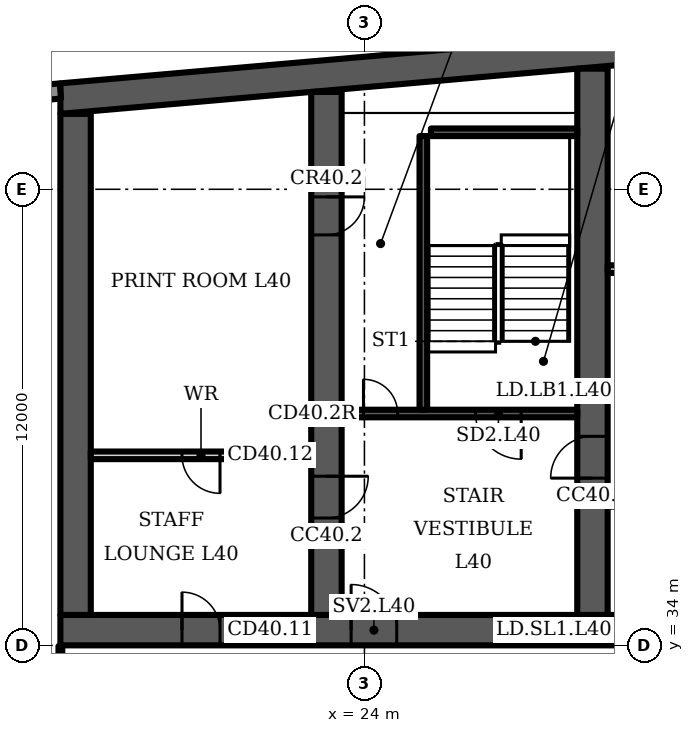
"""IFC4 building model, lengths in metres.
Left out: names, types, materials, properties, quantities, classifications, styles, units other than length and angle.
Written with IfcOpenShell. Run it as: python <this file> out.ifc"""

import sys

from ifc_helpers import new_model, si_unit, direction, frame, frame_2d, origin, place, context, subcontext, project, spatial, polyline, rectangle, outline, extrude, element, fill, save


model = new_model("IFC4")
c1 = context("Model", 3, precision=1e-05, world=origin(), true_north=direction((0.0, 1.0)))
c2 = subcontext(c1, "Body", "Model", "MODEL_VIEW")
j1 = project(units=[si_unit("LENGTHUNIT", "METRE"), si_unit("PLANEANGLEUNIT", "RADIAN")], contexts=[c1])
p1 = place(None, origin())
s1 = spatial("IfcSite", under=j1, at=p1, CompositionType="ELEMENT")
p2 = place(p1, origin())
s2 = spatial("IfcBuilding", under=s1, at=p2, CompositionType="ELEMENT")
p3 = place(p2, frame((0.0, 0.0, 166.3)))
s3 = spatial("IfcBuildingStorey", under=s2, at=p3, CompositionType="ELEMENT", Elevation=166.3)
p4 = place(p3, frame((0.0, 0.0, -0.0)))
e1 = element("IfcWall", 1, at=p4, inside=s3, PredefinedType="SHEAR", context=c2, shape_type="SweptSolid", body=[
    extrude(outline(polyline([(16.0, 47.984), (37.0, 49.822), (58.0, 47.984), (58.0, 48.787), (37.0, 50.625), (16.0, 48.787), (16.0, 47.984)])), origin(), (0.0, 0.0, 1.0), 3.6),
])
p5 = place(p3, frame((16.0, 34.4, 0.0), z_axis=(0.0, 0.0, 1.0), x_axis=(1.0, 0.0, 0.0)))
e2 = element("IfcWall", 2, at=p5, inside=s3, PredefinedType="SHEAR", context=c2, shape_type="SweptSolid", body=[
    extrude(rectangle(XDim=42.0, YDim=0.8, at=frame_2d((21.0, 0.0))), origin(), (0.0, 0.0, 1.0), 3.6),
])
p6 = place(p5, frame((3.2, 0.0, 0.0)))
e3 = element("IfcOpeningElement", 3, at=p6, cuts=e2, PredefinedType="OPENING", context=c2, shape_type="SweptSolid", body=[
    extrude(rectangle(XDim=1.0, YDim=2.1, at=frame_2d((0.5, 1.05))), frame((0.0, 0.41, 0.0), z_axis=(0.0, -1.0, 0.0), x_axis=(1.0, 0.0, 0.0)), (0.0, 0.0, 1.0), 0.82),
])
p7 = place(p5, frame((7.65, 0.0, 0.0)))
e4 = element("IfcOpeningElement", 4, at=p7, cuts=e2, PredefinedType="OPENING", context=c2, shape_type="SweptSolid", body=[
    extrude(rectangle(XDim=1.2, YDim=2.1, at=frame_2d((0.6, 1.05))), frame((0.0, 0.41, 0.0), z_axis=(0.0, -1.0, 0.0), x_axis=(1.0, 0.0, 0.0)), (0.0, 0.0, 1.0), 0.82),
])
p8 = place(p5, frame((14.767, 0.0, 0.0)))
e5 = element("IfcOpeningElement", 5, at=p8, cuts=e2, PredefinedType="OPENING", context=c2, shape_type="SweptSolid", body=[
    extrude(rectangle(XDim=1.1, YDim=2.1, at=frame_2d((0.55, 1.05))), frame((0.0, 0.41, 0.0), z_axis=(0.0, -1.0, 0.0), x_axis=(1.0, 0.0, 0.0)), (0.0, 0.0, 1.0), 0.82),
])
p9 = place(p5, frame((19.133, 0.0, 0.0)))
e6 = element("IfcOpeningElement", 6, at=p9, cuts=e2, PredefinedType="OPENING", context=c2, shape_type="SweptSolid", body=[
    extrude(rectangle(XDim=1.1, YDim=2.1, at=frame_2d((0.55, 1.05))), frame((0.0, 0.41, 0.0), z_axis=(0.0, -1.0, 0.0), x_axis=(1.0, 0.0, 0.0)), (0.0, 0.0, 1.0), 0.82),
])
p10 = place(p5, frame((16.8, 0.0, 0.0)))
e7 = element("IfcOpeningElement", 7, at=p10, cuts=e2, PredefinedType="OPENING", context=c2, shape_type="SweptSolid", body=[
    extrude(rectangle(XDim=1.4, YDim=2.1, at=frame_2d((0.7, 1.05))), frame((0.0, 0.41, 0.0), z_axis=(0.0, -1.0, 0.0), x_axis=(1.0, 0.0, 0.0)), (0.0, 0.0, 1.0), 0.82),
])
p11 = place(p5, frame((21.767, 0.0, 0.0)))
e8 = element("IfcOpeningElement", 8, at=p11, cuts=e2, PredefinedType="OPENING", context=c2, shape_type="SweptSolid", body=[
    extrude(rectangle(XDim=1.1, YDim=2.1, at=frame_2d((0.55, 1.05))), frame((0.0, 0.41, 0.0), z_axis=(0.0, -1.0, 0.0), x_axis=(1.0, 0.0, 0.0)), (0.0, 0.0, 1.0), 0.82),
])
p12 = place(p5, frame((23.95, 0.0, 0.0)))
e9 = element("IfcOpeningElement", 9, at=p12, cuts=e2, PredefinedType="OPENING", context=c2, shape_type="SweptSolid", body=[
    extrude(rectangle(XDim=1.1, YDim=2.1, at=frame_2d((0.55, 1.05))), frame((0.0, 0.41, 0.0), z_axis=(0.0, -1.0, 0.0), x_axis=(1.0, 0.0, 0.0)), (0.0, 0.0, 1.0), 0.82),
])
p13 = place(p5, frame((26.133, 0.0, 0.0)))
e10 = element("IfcOpeningElement", 10, at=p13, cuts=e2, PredefinedType="OPENING", context=c2, shape_type="SweptSolid", body=[
    extrude(rectangle(XDim=1.1, YDim=2.1, at=frame_2d((0.55, 1.05))), frame((0.0, 0.41, 0.0), z_axis=(0.0, -1.0, 0.0), x_axis=(1.0, 0.0, 0.0)), (0.0, 0.0, 1.0), 0.82),
])
p14 = place(p5, frame((33.15, 0.0, 0.0)))
e11 = element("IfcOpeningElement", 11, at=p14, cuts=e2, PredefinedType="OPENING", context=c2, shape_type="SweptSolid", body=[
    extrude(rectangle(XDim=1.2, YDim=2.1, at=frame_2d((0.6, 1.05))), frame((0.0, 0.41, 0.0), z_axis=(0.0, -1.0, 0.0), x_axis=(1.0, 0.0, 0.0)), (0.0, 0.0, 1.0), 0.82),
])
p15 = place(p5, frame((35.817, 0.0, 0.0)))
e12 = element("IfcOpeningElement", 12, at=p15, cuts=e2, PredefinedType="OPENING", context=c2, shape_type="SweptSolid", body=[
    extrude(rectangle(XDim=1.0, YDim=2.1, at=frame_2d((0.5, 1.05))), frame((0.0, 0.41, 0.0), z_axis=(0.0, -1.0, 0.0), x_axis=(1.0, 0.0, 0.0)), (0.0, 0.0, 1.0), 0.82),
])
p16 = place(p5, frame((39.95, 0.0, 0.0)))
e13 = element("IfcOpeningElement", 13, at=p16, cuts=e2, PredefinedType="OPENING", context=c2, shape_type="SweptSolid", body=[
    extrude(rectangle(XDim=1.0, YDim=2.1, at=frame_2d((0.5, 1.05))), frame((0.0, 0.41, 0.0), z_axis=(0.0, -1.0, 0.0), x_axis=(1.0, 0.0, 0.0)), (0.0, 0.0, 1.0), 0.82),
])
p17 = place(p5, frame((37.767, 0.0, 0.0)))
e14 = element("IfcOpeningElement", 14, at=p17, cuts=e2, PredefinedType="OPENING", context=c2, shape_type="SweptSolid", body=[
    extrude(rectangle(XDim=1.4, YDim=2.1, at=frame_2d((0.7, 1.05))), frame((0.0, 0.41, 0.0), z_axis=(0.0, -1.0, 0.0), x_axis=(1.0, 0.0, 0.0)), (0.0, 0.0, 1.0), 0.82),
])
p18 = place(p3, frame((16.4, 34.8, 0.0), z_axis=(0.0, 0.0, 1.0), x_axis=(0.0, 1.0, 0.0)))
e15 = element("IfcWall", 15, at=p18, inside=s3, PredefinedType="SHEAR", context=c2, shape_type="SweptSolid", body=[
    extrude(rectangle(XDim=13.184, YDim=0.8, at=frame_2d((6.592, 0.0))), origin(), (0.0, 0.0, 1.0), 3.6),
])
p19 = place(p3, frame((23.0, 34.8, 0.0), z_axis=(0.0, 0.0, 1.0), x_axis=(0.0, 1.0, 0.0)))
e16 = element("IfcWall", 16, at=p19, inside=s3, PredefinedType="SHEAR", context=c2, shape_type="SweptSolid", body=[
    extrude(rectangle(XDim=13.762, YDim=0.8, at=frame_2d((6.881, 0.0))), origin(), (0.0, 0.0, 1.0), 3.6),
])
p20 = place(p19, frame((2.55, 0.0, 0.0)))
e17 = element("IfcOpeningElement", 17, at=p20, cuts=e16, PredefinedType="OPENING", context=c2, shape_type="SweptSolid", body=[
    extrude(rectangle(XDim=1.1, YDim=2.1, at=frame_2d((0.55, 1.05))), frame((0.0, 0.41, 0.0), z_axis=(0.0, -1.0, 0.0), x_axis=(1.0, 0.0, 0.0)), (0.0, 0.0, 1.0), 0.82),
])
p21 = place(p19, frame((10.0, 0.0, 0.0)))
e18 = element("IfcOpeningElement", 18, at=p21, cuts=e16, PredefinedType="OPENING", context=c2, shape_type="SweptSolid", body=[
    extrude(rectangle(XDim=1.0, YDim=2.1, at=frame_2d((0.5, 1.05))), frame((0.0, 0.41, 0.0), z_axis=(0.0, -1.0, 0.0), x_axis=(1.0, 0.0, 0.0)), (0.0, 0.0, 1.0), 0.82),
])
p22 = place(p3, frame((30.0, 34.8, 0.0), z_axis=(0.0, 0.0, 1.0), x_axis=(0.0, 1.0, 0.0)))
e19 = element("IfcWall", 19, at=p22, inside=s3, PredefinedType="SHEAR", context=c2, shape_type="SweptSolid", body=[
    extrude(rectangle(XDim=14.374, YDim=0.8, at=frame_2d((7.187, 0.0))), origin(), (0.0, 0.0, 1.0), 3.6),
])
p23 = place(p22, frame((3.6, 0.0, 0.0)))
e20 = element("IfcOpeningElement", 20, at=p23, cuts=e19, PredefinedType="OPENING", context=c2, shape_type="SweptSolid", body=[
    extrude(rectangle(XDim=1.1, YDim=2.1, at=frame_2d((0.55, 1.05))), frame((0.0, 0.41, 0.0), z_axis=(0.0, -1.0, 0.0), x_axis=(1.0, 0.0, 0.0)), (0.0, 0.0, 1.0), 0.82),
])
p24 = place(p3, frame((16.0, 48.587, 0.0), z_axis=(0.0, 0.0, 1.0), x_axis=(-0.996194, -0.087168, 0.0)))
e21 = element("IfcWall", 21, at=p24, inside=s3, PredefinedType="SOLIDWALL", context=c2, shape_type="SweptSolid", body=[
    extrude(rectangle(XDim=2.994, YDim=0.4, at=frame_2d((1.497, 0.0))), origin(), (0.0, 0.0, 1.0), 3.2),
])
p25 = place(p3, frame((16.8, 39.0, 0.0), z_axis=(0.0, 0.0, 1.0), x_axis=(1.0, 0.0, 0.0)))
e22 = element("IfcWall", 22, at=p25, inside=s3, PredefinedType="PARTITIONING", context=c2, shape_type="SweptSolid", body=[
    extrude(rectangle(XDim=5.8, YDim=0.2, at=frame_2d((2.9, 0.0))), origin(), (0.0, 0.0, 1.0), 3.2),
])
p26 = place(p25, frame((2.4, 0.0, 0.0)))
e23 = element("IfcOpeningElement", 23, at=p26, cuts=e22, PredefinedType="OPENING", context=c2, shape_type="SweptSolid", body=[
    extrude(rectangle(XDim=1.0, YDim=2.1, at=frame_2d((0.5, 1.05))), frame((0.0, 0.11, 0.0), z_axis=(0.0, -1.0, 0.0), x_axis=(1.0, 0.0, 0.0)), (0.0, 0.0, 1.0), 0.22),
])
p27 = place(p3, frame((23.4, 40.1, 0.0), z_axis=(0.0, 0.0, 1.0), x_axis=(1.0, 0.0, 0.0)))
e24 = element("IfcWall", 24, at=p27, inside=s3, PredefinedType="SHEAR", context=c2, shape_type="SweptSolid", body=[
    extrude(rectangle(XDim=6.2, YDim=0.2, at=frame_2d((3.1, 0.0))), origin(), (0.0, 0.0, 1.0), 3.2),
])
p28 = place(p27, frame((3.525, 0.0, 0.0)))
e25 = element("IfcOpeningElement", 25, at=p28, cuts=e24, PredefinedType="OPENING", context=c2, shape_type="SweptSolid", body=[
    extrude(rectangle(XDim=1.2, YDim=2.1, at=frame_2d((0.6, 1.05))), frame((0.0, 0.11, 0.0), z_axis=(0.0, -1.0, 0.0), x_axis=(1.0, 0.0, 0.0)), (0.0, 0.0, 1.0), 0.22),
])
p29 = place(p27, frame((0.575, 0.0, 0.0)))
e26 = element("IfcOpeningElement", 26, at=p29, cuts=e24, PredefinedType="OPENING", context=c2, shape_type="SweptSolid", body=[
    extrude(rectangle(XDim=0.9, YDim=2.1, at=frame_2d((0.45, 1.05))), frame((0.0, 0.11, 0.0), z_axis=(0.0, -1.0, 0.0), x_axis=(1.0, 0.0, 0.0)), (0.0, 0.0, 1.0), 0.22),
])
p30 = place(p3, frame((25.55, 40.2, 0.0), z_axis=(0.0, 0.0, 1.0), x_axis=(0.0, 1.0, 0.0)))
e27 = element("IfcWall", 27, at=p30, inside=s3, PredefinedType="SHEAR", context=c2, shape_type="SweptSolid", body=[
    extrude(rectangle(XDim=7.2, YDim=0.2, at=frame_2d((3.6, 0.0))), origin(), (0.0, 0.0, 1.0), 3.2),
])
p31 = place(p3, frame((25.75, 47.5, 0.0), z_axis=(0.0, 0.0, 1.0), x_axis=(1.0, 0.0, 0.0)))
e28 = element("IfcWall", 28, at=p31, inside=s3, PredefinedType="SHEAR", context=c2, shape_type="SweptSolid", body=[
    extrude(rectangle(XDim=3.85, YDim=0.2, at=frame_2d((1.925, 0.0))), origin(), (0.0, 0.0, 1.0), 3.2),
])
p32 = place(p3, frame((30.4, 40.7, 0.0), z_axis=(0.0, 0.0, 1.0), x_axis=(1.0, 0.0, 0.0)))
e29 = element("IfcWall", 29, at=p32, inside=s3, PredefinedType="PARTITIONING", context=c2, shape_type="SweptSolid", body=[
    extrude(rectangle(XDim=6.2, YDim=0.2, at=frame_2d((3.1, 0.0))), origin(), (0.0, 0.0, 1.0), 3.2),
])
p33 = place(p32, frame((0.367, 0.0, 0.0)))
e30 = element("IfcOpeningElement", 30, at=p33, cuts=e29, PredefinedType="OPENING", context=c2, shape_type="SweptSolid", body=[
    extrude(rectangle(XDim=1.1, YDim=2.1, at=frame_2d((0.55, 1.05))), frame((0.0, 0.11, 0.0), z_axis=(0.0, -1.0, 0.0), x_axis=(1.0, 0.0, 0.0)), (0.0, 0.0, 1.0), 0.22),
])
p34 = place(p32, frame((2.55, 0.0, 0.0)))
e31 = element("IfcOpeningElement", 31, at=p34, cuts=e29, PredefinedType="OPENING", context=c2, shape_type="SweptSolid", body=[
    extrude(rectangle(XDim=1.1, YDim=2.1, at=frame_2d((0.55, 1.05))), frame((0.0, 0.11, 0.0), z_axis=(0.0, -1.0, 0.0), x_axis=(1.0, 0.0, 0.0)), (0.0, 0.0, 1.0), 0.22),
])
p35 = place(p32, frame((4.733, 0.0, 0.0)))
e32 = element("IfcOpeningElement", 32, at=p35, cuts=e29, PredefinedType="OPENING", context=c2, shape_type="SweptSolid", body=[
    extrude(rectangle(XDim=1.1, YDim=2.1, at=frame_2d((0.55, 1.05))), frame((0.0, 0.11, 0.0), z_axis=(0.0, -1.0, 0.0), x_axis=(1.0, 0.0, 0.0)), (0.0, 0.0, 1.0), 0.22),
])
p36 = place(p3, frame((0.0, 0.0, -0.0)))
e33 = element("IfcWall", 33, at=p36, inside=s3, PredefinedType="PARTITIONING", context=c2, shape_type="SweptSolid", body=[
    extrude(outline(polyline([(32.233, 37.65), (30.4, 37.65), (30.4, 37.85), (32.233, 37.85), (32.433, 37.85), (32.433, 34.8), (32.233, 34.8), (32.233, 37.65)])), origin(), (0.0, 0.0, 1.0), 3.2),
])
p37 = place(p3, frame((0.0, 0.0, -0.0)))
e34 = element("IfcWall", 34, at=p37, inside=s3, PredefinedType="PARTITIONING", context=c2, shape_type="SweptSolid", body=[
    extrude(outline(polyline([(32.433, 40.8), (32.233, 40.8), (32.233, 43.8), (30.4, 43.8), (30.4, 44.0), (36.6, 44.0), (36.6, 43.8), (34.767, 43.8), (34.767, 40.8), (34.567, 40.8), (34.567, 43.8), (32.433, 43.8), (32.433, 40.8)])), origin(), (0.0, 0.0, 1.0), 3.2),
])
p38 = place(p3, frame((16.0, 26.42, 0.0), z_axis=(0.0, 0.0, 1.0), x_axis=(0.0, 1.0, 0.0)))
e35 = element("IfcWall", 35, at=p38, inside=s3, PredefinedType="PARTITIONING", context=c2, shape_type="SweptSolid", body=[
    extrude(rectangle(XDim=7.56, YDim=0.1, at=frame_2d((3.78, 0.0))), origin(), (0.0, 0.0, 1.0), 3.2),
])
p39 = place(p38, frame((1.48, 0.0, 0.0)))
e36 = element("IfcOpeningElement", 36, at=p39, cuts=e35, PredefinedType="OPENING", context=c2, shape_type="SweptSolid", body=[
    extrude(rectangle(XDim=1.8, YDim=2.1, at=frame_2d((0.9, 1.05))), frame((0.0, 0.06, 0.0), z_axis=(0.0, -1.0, 0.0), x_axis=(1.0, 0.0, 0.0)), (0.0, 0.0, 1.0), 0.12),
])
p40 = place(p6, origin())
e37 = element("IfcDoor", 37, at=p40, inside=s3, OperationType="SINGLE_SWING_LEFT", PredefinedType="DOOR", context=c2, shape_type="SweptSolid", body=[
    extrude(rectangle(XDim=1.0, YDim=2.1, at=frame_2d((0.5, 1.05))), frame((0.0, 0.4, 0.0), z_axis=(0.0, -1.0, 0.0), x_axis=(1.0, 0.0, 0.0)), (0.0, 0.0, 1.0), 0.8),
])
fill(e3, e37)
p41 = place(p26, origin())
e38 = element("IfcDoor", 38, at=p41, inside=s3, OperationType="SINGLE_SWING_RIGHT", PredefinedType="DOOR", context=c2, shape_type="SweptSolid", body=[
    extrude(rectangle(XDim=1.0, YDim=2.1, at=frame_2d((0.5, 1.05))), frame((0.0, 0.025, 0.0), z_axis=(0.0, -1.0, 0.0), x_axis=(1.0, 0.0, 0.0)), (0.0, 0.0, 1.0), 0.05),
])
fill(e23, e38)
p42 = place(p28, origin())
e39 = element("IfcDoor", 39, at=p42, inside=s3, OperationType="SINGLE_SWING_RIGHT", PredefinedType="DOOR", context=c2, shape_type="SweptSolid", body=[
    extrude(rectangle(XDim=1.2, YDim=2.1, at=frame_2d((0.6, 1.05))), frame((0.0, 0.025, 0.0), z_axis=(0.0, -1.0, 0.0), x_axis=(1.0, 0.0, 0.0)), (0.0, 0.0, 1.0), 0.05),
])
fill(e25, e39)
p43 = place(p29, origin())
e40 = element("IfcDoor", 40, at=p43, inside=s3, OperationType="SINGLE_SWING_LEFT", PredefinedType="DOOR", context=c2, shape_type="SweptSolid", body=[
    extrude(rectangle(XDim=0.9, YDim=2.1, at=frame_2d((0.45, 1.05))), frame((0.0, 0.025, 0.0), z_axis=(0.0, -1.0, 0.0), x_axis=(1.0, 0.0, 0.0)), (0.0, 0.0, 1.0), 0.05),
])
fill(e26, e40)
p44 = place(p7, origin())
e41 = element("IfcDoor", 41, at=p44, inside=s3, OperationType="SINGLE_SWING_LEFT", PredefinedType="DOOR", context=c2, shape_type="SweptSolid", body=[
    extrude(rectangle(XDim=1.2, YDim=2.1, at=frame_2d((0.6, 1.05))), frame((0.0, 0.025, 0.0), z_axis=(0.0, -1.0, 0.0), x_axis=(1.0, 0.0, 0.0)), (0.0, 0.0, 1.0), 0.05),
])
fill(e4, e41)
p45 = place(p20, origin())
e42 = element("IfcDoor", 42, at=p45, inside=s3, OperationType="SINGLE_SWING_RIGHT", PredefinedType="DOOR", context=c2, shape_type="SweptSolid", body=[
    extrude(rectangle(XDim=1.1, YDim=2.1, at=frame_2d((0.55, 1.05))), frame((0.0, 0.025, 0.0), z_axis=(0.0, -1.0, 0.0), x_axis=(1.0, 0.0, 0.0)), (0.0, 0.0, 1.0), 0.05),
])
fill(e17, e42)
p46 = place(p21, origin())
e43 = element("IfcDoor", 43, at=p46, inside=s3, OperationType="SINGLE_SWING_RIGHT", PredefinedType="DOOR", context=c2, shape_type="SweptSolid", body=[
    extrude(rectangle(XDim=1.0, YDim=2.1, at=frame_2d((0.5, 1.05))), frame((0.0, 0.4, 0.0), z_axis=(0.0, -1.0, 0.0), x_axis=(1.0, 0.0, 0.0)), (0.0, 0.0, 1.0), 0.8),
])
fill(e18, e43)
p47 = place(p23, origin())
e44 = element("IfcDoor", 44, at=p47, inside=s3, OperationType="SINGLE_SWING_LEFT", PredefinedType="DOOR", context=c2, shape_type="SweptSolid", body=[
    extrude(rectangle(XDim=1.1, YDim=2.1, at=frame_2d((0.55, 1.05))), frame((0.0, 0.025, 0.0), z_axis=(0.0, -1.0, 0.0), x_axis=(1.0, 0.0, 0.0)), (0.0, 0.0, 1.0), 0.05),
])
fill(e20, e44)
save(model, sys.argv[1])
